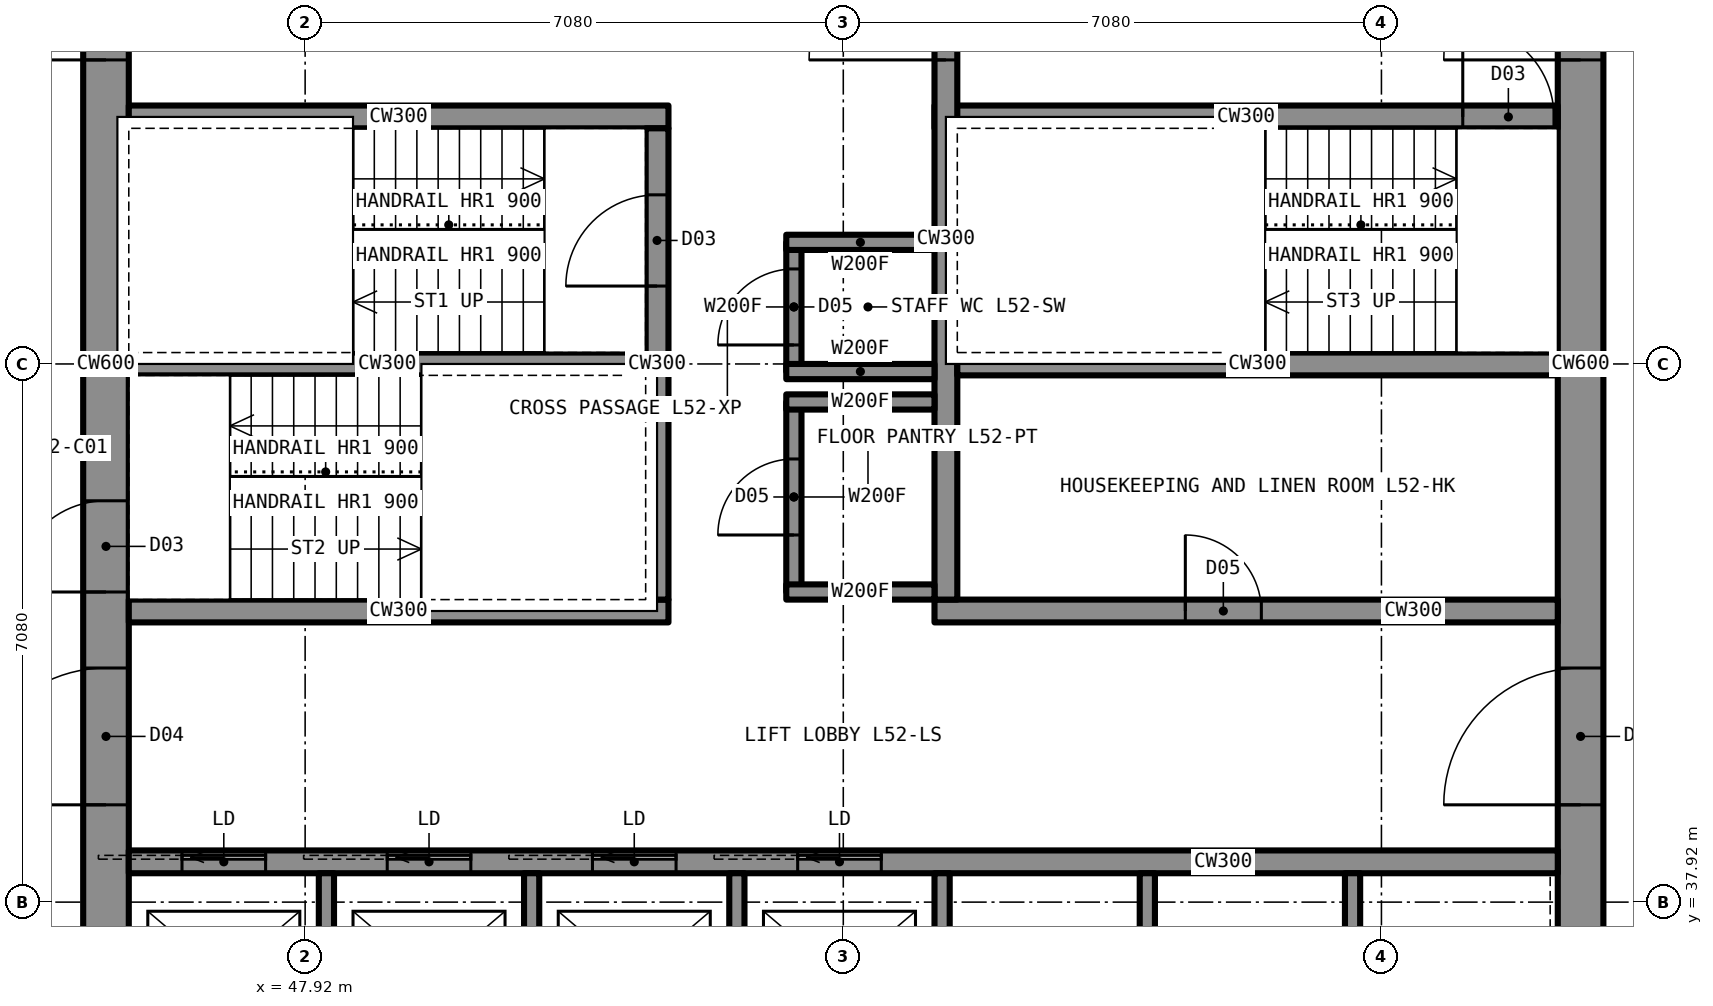
"""IFC4 building model, lengths in metres.
Left out: names, types, materials, properties, quantities, classifications, styles, units other than length and angle.
Written with IfcOpenShell. Run it as: python <this file> out.ifc"""

import sys

from ifc_helpers import new_model, si_unit, direction, frame, frame_2d, origin, place, context, subcontext, project, spatial, rectangle, extrude, element, fill, save


model = new_model("IFC4")
c1 = context("Model", 3, precision=1e-05, world=origin(), true_north=direction((0.0, 1.0)))
c2 = subcontext(c1, "Body", "Model", "MODEL_VIEW")
j1 = project(units=[si_unit("LENGTHUNIT", "METRE"), si_unit("PLANEANGLEUNIT", "RADIAN")], contexts=[c1])
p1 = place(None, origin())
s1 = spatial("IfcSite", under=j1, at=p1, CompositionType="ELEMENT")
p2 = place(p1, origin())
s2 = spatial("IfcBuilding", under=s1, at=p2, CompositionType="ELEMENT")
p3 = place(p2, frame((0.0, 0.0, 193.3)))
s3 = spatial("IfcBuildingStorey", under=s2, at=p3, CompositionType="ELEMENT", Elevation=193.3)
p4 = place(p3, frame((64.7, 35.6, 0.0), z_axis=(0.0, 0.0, 1.0), x_axis=(0.0, 1.0, 0.0)))
e1 = element("IfcWall", 1, at=p4, inside=s3, PredefinedType="SHEAR", context=c2, shape_type="SweptSolid", body=[
    extrude(rectangle(XDim=18.8, YDim=0.6, at=frame_2d((9.4, 0.0))), origin(), (0.0, 0.0, 1.0), 3.5),
])
p5 = place(p4, frame((13.4, 0.0, 0.0)))
e2 = element("IfcOpeningElement", 2, at=p5, cuts=e1, PredefinedType="OPENING", context=c2, shape_type="SweptSolid", body=[
    extrude(rectangle(XDim=1.8, YDim=2.2, at=frame_2d((0.9, 1.1))), frame((0.0, 0.31, 0.0), z_axis=(0.0, -1.0, 0.0), x_axis=(1.0, 0.0, 0.0)), (0.0, 0.0, 1.0), 0.62),
])
p6 = place(p4, frame((3.6, 0.0, 0.0)))
e3 = element("IfcOpeningElement", 3, at=p6, cuts=e1, PredefinedType="OPENING", context=c2, shape_type="SweptSolid", body=[
    extrude(rectangle(XDim=1.8, YDim=2.2, at=frame_2d((0.9, 1.1))), frame((0.0, 0.31, 0.0), z_axis=(0.0, -1.0, 0.0), x_axis=(1.0, 0.0, 0.0)), (0.0, 0.0, 1.0), 0.62),
])
p7 = place(p3, frame((45.3, 35.6, 0.0), z_axis=(0.0, 0.0, 1.0), x_axis=(0.0, 1.0, 0.0)))
e4 = element("IfcWall", 4, at=p7, inside=s3, PredefinedType="SHEAR", context=c2, shape_type="SweptSolid", body=[
    extrude(rectangle(XDim=18.8, YDim=0.6, at=frame_2d((9.4, 0.0))), origin(), (0.0, 0.0, 1.0), 3.5),
])
p8 = place(p7, frame((13.4, 0.0, 0.0)))
e5 = element("IfcOpeningElement", 5, at=p8, cuts=e4, PredefinedType="OPENING", context=c2, shape_type="SweptSolid", body=[
    extrude(rectangle(XDim=1.8, YDim=2.2, at=frame_2d((0.9, 1.1))), frame((0.0, 0.31, 0.0), z_axis=(0.0, -1.0, 0.0), x_axis=(1.0, 0.0, 0.0)), (0.0, 0.0, 1.0), 0.62),
])
p9 = place(p7, frame((3.6, 0.0, 0.0)))
e6 = element("IfcOpeningElement", 6, at=p9, cuts=e4, PredefinedType="OPENING", context=c2, shape_type="SweptSolid", body=[
    extrude(rectangle(XDim=1.8, YDim=2.2, at=frame_2d((0.9, 1.1))), frame((0.0, 0.31, 0.0), z_axis=(0.0, -1.0, 0.0), x_axis=(1.0, 0.0, 0.0)), (0.0, 0.0, 1.0), 0.62),
])
p10 = place(p7, frame((6.4, 0.0, 0.0)))
e7 = element("IfcOpeningElement", 7, at=p10, cuts=e4, PredefinedType="OPENING", context=c2, shape_type="SweptSolid", body=[
    extrude(rectangle(XDim=1.2, YDim=2.2, at=frame_2d((0.6, 1.1))), frame((0.0, 0.31, 0.0), z_axis=(0.0, -1.0, 0.0), x_axis=(1.0, 0.0, 0.0)), (0.0, 0.0, 1.0), 0.62),
])
p11 = place(p3, frame((45.6, 38.45, 0.0), z_axis=(0.0, 0.0, 1.0), x_axis=(1.0, 0.0, 0.0)))
e8 = element("IfcWall", 8, at=p11, inside=s3, PredefinedType="SHEAR", context=c2, shape_type="SweptSolid", body=[
    extrude(rectangle(XDim=18.8, YDim=0.3, at=frame_2d((9.4, 0.0))), origin(), (0.0, 0.0, 1.0), 3.5),
])
p12 = place(p11, frame((0.7, 0.0, 0.0)))
e9 = element("IfcOpeningElement", 9, at=p12, cuts=e8, PredefinedType="OPENING", context=c2, shape_type="SweptSolid", body=[
    extrude(rectangle(XDim=1.1, YDim=2.2, at=frame_2d((0.55, 1.1))), frame((0.0, 0.16, 0.0), z_axis=(0.0, -1.0, 0.0), x_axis=(1.0, 0.0, 0.0)), (0.0, 0.0, 1.0), 0.32),
])
p13 = place(p11, frame((3.4, 0.0, 0.0)))
e10 = element("IfcOpeningElement", 10, at=p13, cuts=e8, PredefinedType="OPENING", context=c2, shape_type="SweptSolid", body=[
    extrude(rectangle(XDim=1.1, YDim=2.2, at=frame_2d((0.55, 1.1))), frame((0.0, 0.16, 0.0), z_axis=(0.0, -1.0, 0.0), x_axis=(1.0, 0.0, 0.0)), (0.0, 0.0, 1.0), 0.32),
])
p14 = place(p11, frame((6.1, 0.0, 0.0)))
e11 = element("IfcOpeningElement", 11, at=p14, cuts=e8, PredefinedType="OPENING", context=c2, shape_type="SweptSolid", body=[
    extrude(rectangle(XDim=1.1, YDim=2.2, at=frame_2d((0.55, 1.1))), frame((0.0, 0.16, 0.0), z_axis=(0.0, -1.0, 0.0), x_axis=(1.0, 0.0, 0.0)), (0.0, 0.0, 1.0), 0.32),
])
p15 = place(p11, frame((8.8, 0.0, 0.0)))
e12 = element("IfcOpeningElement", 12, at=p15, cuts=e8, PredefinedType="OPENING", context=c2, shape_type="SweptSolid", body=[
    extrude(rectangle(XDim=1.1, YDim=2.2, at=frame_2d((0.55, 1.1))), frame((0.0, 0.16, 0.0), z_axis=(0.0, -1.0, 0.0), x_axis=(1.0, 0.0, 0.0)), (0.0, 0.0, 1.0), 0.32),
])
p16 = place(p3, frame((45.6, 48.25, 0.0), z_axis=(0.0, 0.0, 1.0), x_axis=(1.0, 0.0, 0.0)))
e13 = element("IfcWall", 13, at=p16, inside=s3, PredefinedType="SHEAR", context=c2, shape_type="SweptSolid", body=[
    extrude(rectangle(XDim=7.1, YDim=0.3, at=frame_2d((3.55, 0.0))), origin(), (0.0, 0.0, 1.0), 3.5),
])
p17 = place(p3, frame((56.2, 48.25, 0.0), z_axis=(0.0, 0.0, 1.0), x_axis=(1.0, 0.0, 0.0)))
e14 = element("IfcWall", 14, at=p17, inside=s3, PredefinedType="SHEAR", context=c2, shape_type="SweptSolid", body=[
    extrude(rectangle(XDim=8.2, YDim=0.3, at=frame_2d((4.1, 0.0))), origin(), (0.0, 0.0, 1.0), 3.5),
])
p18 = place(p17, frame((6.95, 0.0, 0.0)))
e15 = element("IfcOpeningElement", 15, at=p18, cuts=e14, PredefinedType="OPENING", context=c2, shape_type="SweptSolid", body=[
    extrude(rectangle(XDim=1.2, YDim=2.2, at=frame_2d((0.6, 1.1))), frame((0.0, 0.16, 0.0), z_axis=(0.0, -1.0, 0.0), x_axis=(1.0, 0.0, 0.0)), (0.0, 0.0, 1.0), 0.32),
])
p19 = place(p3, frame((45.6, 41.75, 0.0), z_axis=(0.0, 0.0, 1.0), x_axis=(1.0, 0.0, 0.0)))
e16 = element("IfcWall", 16, at=p19, inside=s3, PredefinedType="SHEAR", context=c2, shape_type="SweptSolid", body=[
    extrude(rectangle(XDim=7.1, YDim=0.3, at=frame_2d((3.55, 0.0))), origin(), (0.0, 0.0, 1.0), 3.5),
])
p20 = place(p3, frame((56.2, 41.75, 0.0), z_axis=(0.0, 0.0, 1.0), x_axis=(1.0, 0.0, 0.0)))
e17 = element("IfcWall", 17, at=p20, inside=s3, PredefinedType="SHEAR", context=c2, shape_type="SweptSolid", body=[
    extrude(rectangle(XDim=8.2, YDim=0.3, at=frame_2d((4.1, 0.0))), origin(), (0.0, 0.0, 1.0), 3.5),
])
p21 = place(p20, frame((3.3, 0.0, 0.0)))
e18 = element("IfcOpeningElement", 18, at=p21, cuts=e17, PredefinedType="OPENING", context=c2, shape_type="SweptSolid", body=[
    extrude(rectangle(XDim=1.0, YDim=2.1, at=frame_2d((0.5, 1.05))), frame((0.0, 0.16, 0.0), z_axis=(0.0, -1.0, 0.0), x_axis=(1.0, 0.0, 0.0)), (0.0, 0.0, 1.0), 0.32),
])
p22 = place(p3, frame((52.55, 41.9, 0.0), z_axis=(0.0, 0.0, 1.0), x_axis=(0.0, 1.0, 0.0)))
e19 = element("IfcWall", 19, at=p22, inside=s3, PredefinedType="SHEAR", context=c2, shape_type="SweptSolid", body=[
    extrude(rectangle(XDim=6.2, YDim=0.3, at=frame_2d((3.1, 0.0))), origin(), (0.0, 0.0, 1.0), 3.5),
])
p23 = place(p22, frame((4.125, 0.0, 0.0)))
e20 = element("IfcOpeningElement", 20, at=p23, cuts=e19, PredefinedType="OPENING", context=c2, shape_type="SweptSolid", body=[
    extrude(rectangle(XDim=1.2, YDim=2.2, at=frame_2d((0.6, 1.1))), frame((0.0, 0.16, 0.0), z_axis=(0.0, -1.0, 0.0), x_axis=(1.0, 0.0, 0.0)), (0.0, 0.0, 1.0), 0.32),
])
p24 = place(p3, frame((56.35, 41.9, 0.0), z_axis=(0.0, 0.0, 1.0), x_axis=(0.0, 1.0, 0.0)))
e21 = element("IfcWall", 21, at=p24, inside=s3, PredefinedType="SHEAR", context=c2, shape_type="SweptSolid", body=[
    extrude(rectangle(XDim=9.5, YDim=0.3, at=frame_2d((4.75, 0.0))), origin(), (0.0, 0.0, 1.0), 3.5),
])
p25 = place(p24, frame((7.1, 0.0, 0.0)))
e22 = element("IfcOpeningElement", 22, at=p25, cuts=e21, PredefinedType="OPENING", context=c2, shape_type="SweptSolid", body=[
    extrude(rectangle(XDim=1.8, YDim=2.2, at=frame_2d((0.9, 1.1))), frame((0.0, 0.16, 0.0), z_axis=(0.0, -1.0, 0.0), x_axis=(1.0, 0.0, 0.0)), (0.0, 0.0, 1.0), 0.32),
])
p26 = place(p3, frame((45.6, 45.0, 0.0), z_axis=(0.0, 0.0, 1.0), x_axis=(1.0, 0.0, 0.0)))
e23 = element("IfcWall", 23, at=p26, inside=s3, PredefinedType="SHEAR", context=c2, shape_type="SweptSolid", body=[
    extrude(rectangle(XDim=6.8, YDim=0.3, at=frame_2d((3.4, 0.0))), origin(), (0.0, 0.0, 1.0), 3.5),
])
p27 = place(p3, frame((56.5, 45.0, 0.0), z_axis=(0.0, 0.0, 1.0), x_axis=(1.0, 0.0, 0.0)))
e24 = element("IfcWall", 24, at=p27, inside=s3, PredefinedType="SHEAR", context=c2, shape_type="SweptSolid", body=[
    extrude(rectangle(XDim=7.9, YDim=0.3, at=frame_2d((3.95, 0.0))), origin(), (0.0, 0.0, 1.0), 3.5),
])
p28 = place(p3, frame((54.35, 42.0, 0.0), z_axis=(0.0, 0.0, 1.0), x_axis=(0.0, 1.0, 0.0)))
e25 = element("IfcWall", 25, at=p28, inside=s3, PredefinedType="PARTITIONING", context=c2, shape_type="SweptSolid", body=[
    extrude(rectangle(XDim=2.5, YDim=0.2, at=frame_2d((1.25, 0.0))), origin(), (0.0, 0.0, 1.0), 3.33),
])
p29 = place(p28, frame((0.75, 0.0, 0.0)))
e26 = element("IfcOpeningElement", 26, at=p29, cuts=e25, PredefinedType="OPENING", context=c2, shape_type="SweptSolid", body=[
    extrude(rectangle(XDim=1.0, YDim=2.1, at=frame_2d((0.5, 1.05))), frame((0.0, 0.11, 0.0), z_axis=(0.0, -1.0, 0.0), x_axis=(1.0, 0.0, 0.0)), (0.0, 0.0, 1.0), 0.22),
])
for number, where, z_axis, x_axis in (
    (27, (54.25, 42.0, 0.0), (0.0, 0.0, 1.0), (1.0, 0.0, 0.0)),
    (28, (54.25, 44.5, 0.0), (0.0, 0.0, 1.0), (1.0, 0.0, 0.0)),
):
    element("IfcWall", number, at=place(p3, frame(where, z_axis=z_axis, x_axis=x_axis)), inside=s3, PredefinedType="PARTITIONING", context=c2, shape_type="SweptSolid", body=[
        extrude(rectangle(XDim=1.95, YDim=0.2, at=frame_2d((0.975, 0.0))), origin(), (0.0, 0.0, 1.0), 3.33),
    ])
p30 = place(p3, frame((54.35, 44.9, 0.0), z_axis=(0.0, 0.0, 1.0), x_axis=(0.0, 1.0, 0.0)))
e29 = element("IfcWall", 29, at=p30, inside=s3, PredefinedType="PARTITIONING", context=c2, shape_type="SweptSolid", body=[
    extrude(rectangle(XDim=1.7, YDim=0.2, at=frame_2d((0.85, 0.0))), origin(), (0.0, 0.0, 1.0), 3.33),
])
p31 = place(p30, frame((0.35, 0.0, 0.0)))
e30 = element("IfcOpeningElement", 30, at=p31, cuts=e29, PredefinedType="OPENING", context=c2, shape_type="SweptSolid", body=[
    extrude(rectangle(XDim=1.0, YDim=2.1, at=frame_2d((0.5, 1.05))), frame((0.0, 0.11, 0.0), z_axis=(0.0, -1.0, 0.0), x_axis=(1.0, 0.0, 0.0)), (0.0, 0.0, 1.0), 0.22),
])
for number, where, z_axis, x_axis in (
    (31, (54.25, 44.9, 0.0), (0.0, 0.0, 1.0), (1.0, 0.0, 0.0)),
    (32, (54.25, 46.6, 0.0), (0.0, 0.0, 1.0), (1.0, 0.0, 0.0)),
):
    element("IfcWall", number, at=place(p3, frame(where, z_axis=z_axis, x_axis=x_axis)), inside=s3, PredefinedType="PARTITIONING", context=c2, shape_type="SweptSolid", body=[
        extrude(rectangle(XDim=1.95, YDim=0.2, at=frame_2d((0.975, 0.0))), origin(), (0.0, 0.0, 1.0), 3.33),
    ])
for number, where, z_axis, x_axis in (
    (33, (48.2, 35.6, 0.0), (0.0, 0.0, 1.0), (0.0, 1.0, 0.0)),
    (34, (50.9, 35.6, 0.0), (0.0, 0.0, 1.0), (0.0, 1.0, 0.0)),
    (35, (53.6, 35.6, 0.0), (0.0, 0.0, 1.0), (0.0, 1.0, 0.0)),
    (36, (56.3, 35.6, 0.0), (0.0, 0.0, 1.0), (0.0, 1.0, 0.0)),
    (37, (59.0, 35.6, 0.0), (0.0, 0.0, 1.0), (0.0, 1.0, 0.0)),
    (38, (61.7, 35.6, 0.0), (0.0, 0.0, 1.0), (0.0, 1.0, 0.0)),
):
    element("IfcWall", number, at=place(p3, frame(where, z_axis=z_axis, x_axis=x_axis)), inside=s3, PredefinedType="PARTITIONING", context=c2, shape_type="SweptSolid", body=[
        extrude(rectangle(XDim=2.7, YDim=0.2, at=frame_2d((1.35, 0.0))), origin(), (0.0, 0.0, 1.0), 3.33),
    ])
p32 = place(p29, origin())
e39 = element("IfcDoor", 39, at=p32, inside=s3, OperationType="SINGLE_SWING_LEFT", PredefinedType="DOOR", context=c2, shape_type="SweptSolid", body=[
    extrude(rectangle(XDim=1.0, YDim=2.1, at=frame_2d((0.5, 1.05))), frame((0.0, 0.025, 0.0), z_axis=(0.0, -1.0, 0.0), x_axis=(1.0, 0.0, 0.0)), (0.0, 0.0, 1.0), 0.05),
])
fill(e26, e39)
p33 = place(p31, origin())
e40 = element("IfcDoor", 40, at=p33, inside=s3, OperationType="SINGLE_SWING_LEFT", PredefinedType="DOOR", context=c2, shape_type="SweptSolid", body=[
    extrude(rectangle(XDim=1.0, YDim=2.1, at=frame_2d((0.5, 1.05))), frame((0.0, 0.025, 0.0), z_axis=(0.0, -1.0, 0.0), x_axis=(1.0, 0.0, 0.0)), (0.0, 0.0, 1.0), 0.05),
])
fill(e30, e40)
p34 = place(p8, origin())
e41 = element("IfcDoor", 41, at=p34, inside=s3, OperationType="DOUBLE_DOOR_SINGLE_SWING", PredefinedType="DOOR", context=c2, shape_type="SweptSolid", body=[
    extrude(rectangle(XDim=1.8, YDim=2.2, at=frame_2d((0.9, 1.1))), frame((0.0, 0.025, 0.0), z_axis=(0.0, -1.0, 0.0), x_axis=(1.0, 0.0, 0.0)), (0.0, 0.0, 1.0), 0.05),
])
fill(e5, e41)
p35 = place(p9, origin())
e42 = element("IfcDoor", 42, at=p35, inside=s3, OperationType="DOUBLE_DOOR_SINGLE_SWING", PredefinedType="DOOR", context=c2, shape_type="SweptSolid", body=[
    extrude(rectangle(XDim=1.8, YDim=2.2, at=frame_2d((0.9, 1.1))), frame((0.0, 0.025, 0.0), z_axis=(0.0, -1.0, 0.0), x_axis=(1.0, 0.0, 0.0)), (0.0, 0.0, 1.0), 0.05),
])
fill(e6, e42)
p36 = place(p5, origin())
e43 = element("IfcDoor", 43, at=p36, inside=s3, OperationType="DOUBLE_DOOR_SINGLE_SWING", PredefinedType="DOOR", context=c2, shape_type="SweptSolid", body=[
    extrude(rectangle(XDim=1.8, YDim=2.2, at=frame_2d((0.9, 1.1))), frame((0.0, 0.025, 0.0), z_axis=(0.0, -1.0, 0.0), x_axis=(1.0, 0.0, 0.0)), (0.0, 0.0, 1.0), 0.05),
])
fill(e2, e43)
p37 = place(p6, origin())
e44 = element("IfcDoor", 44, at=p37, inside=s3, OperationType="DOUBLE_DOOR_SINGLE_SWING", PredefinedType="DOOR", context=c2, shape_type="SweptSolid", body=[
    extrude(rectangle(XDim=1.8, YDim=2.2, at=frame_2d((0.9, 1.1))), frame((0.0, 0.025, 0.0), z_axis=(0.0, -1.0, 0.0), x_axis=(1.0, 0.0, 0.0)), (0.0, 0.0, 1.0), 0.05),
])
fill(e3, e44)
p38 = place(p25, origin())
e45 = element("IfcDoor", 45, at=p38, inside=s3, OperationType="DOUBLE_DOOR_SINGLE_SWING", PredefinedType="DOOR", context=c2, shape_type="SweptSolid", body=[
    extrude(rectangle(XDim=1.8, YDim=2.2, at=frame_2d((0.9, 1.1))), frame((0.0, 0.025, 0.0), z_axis=(0.0, -1.0, 0.0), x_axis=(1.0, 0.0, 0.0)), (0.0, 0.0, 1.0), 0.05),
])
fill(e22, e45)
p39 = place(p23, origin())
e46 = element("IfcDoor", 46, at=p39, inside=s3, OperationType="SINGLE_SWING_LEFT", PredefinedType="DOOR", context=c2, shape_type="SweptSolid", body=[
    extrude(rectangle(XDim=1.2, YDim=2.2, at=frame_2d((0.6, 1.1))), frame((0.0, 0.025, 0.0), z_axis=(0.0, -1.0, 0.0), x_axis=(1.0, 0.0, 0.0)), (0.0, 0.0, 1.0), 0.05),
])
fill(e20, e46)
p40 = place(p10, origin())
e47 = element("IfcDoor", 47, at=p40, inside=s3, OperationType="SINGLE_SWING_LEFT", PredefinedType="DOOR", context=c2, shape_type="SweptSolid", body=[
    extrude(rectangle(XDim=1.2, YDim=2.2, at=frame_2d((0.6, 1.1))), frame((0.0, 0.025, 0.0), z_axis=(0.0, -1.0, 0.0), x_axis=(1.0, 0.0, 0.0)), (0.0, 0.0, 1.0), 0.05),
])
fill(e7, e47)
p41 = place(p18, origin())
e48 = element("IfcDoor", 48, at=p41, inside=s3, OperationType="SINGLE_SWING_LEFT", PredefinedType="DOOR", context=c2, shape_type="SweptSolid", body=[
    extrude(rectangle(XDim=1.2, YDim=2.2, at=frame_2d((0.6, 1.1))), frame((0.0, 0.025, 0.0), z_axis=(0.0, -1.0, 0.0), x_axis=(1.0, 0.0, 0.0)), (0.0, 0.0, 1.0), 0.05),
])
fill(e15, e48)
p42 = place(p21, origin())
e49 = element("IfcDoor", 49, at=p42, inside=s3, OperationType="SINGLE_SWING_LEFT", PredefinedType="DOOR", context=c2, shape_type="SweptSolid", body=[
    extrude(rectangle(XDim=1.0, YDim=2.1, at=frame_2d((0.5, 1.05))), frame((0.0, 0.025, 0.0), z_axis=(0.0, -1.0, 0.0), x_axis=(1.0, 0.0, 0.0)), (0.0, 0.0, 1.0), 0.05),
])
fill(e18, e49)
p43 = place(p12, origin())
e50 = element("IfcDoor", 50, at=p43, inside=s3, OperationType="SLIDING_TO_LEFT", PredefinedType="DOOR", context=c2, shape_type="SweptSolid", body=[
    extrude(rectangle(XDim=1.1, YDim=2.2, at=frame_2d((0.55, 1.1))), frame((0.0, 0.025, 0.0), z_axis=(0.0, -1.0, 0.0), x_axis=(1.0, 0.0, 0.0)), (0.0, 0.0, 1.0), 0.05),
])
fill(e9, e50)
p44 = place(p13, origin())
e51 = element("IfcDoor", 51, at=p44, inside=s3, OperationType="SLIDING_TO_LEFT", PredefinedType="DOOR", context=c2, shape_type="SweptSolid", body=[
    extrude(rectangle(XDim=1.1, YDim=2.2, at=frame_2d((0.55, 1.1))), frame((0.0, 0.025, 0.0), z_axis=(0.0, -1.0, 0.0), x_axis=(1.0, 0.0, 0.0)), (0.0, 0.0, 1.0), 0.05),
])
fill(e10, e51)
p45 = place(p14, origin())
e52 = element("IfcDoor", 52, at=p45, inside=s3, OperationType="SLIDING_TO_LEFT", PredefinedType="DOOR", context=c2, shape_type="SweptSolid", body=[
    extrude(rectangle(XDim=1.1, YDim=2.2, at=frame_2d((0.55, 1.1))), frame((0.0, 0.025, 0.0), z_axis=(0.0, -1.0, 0.0), x_axis=(1.0, 0.0, 0.0)), (0.0, 0.0, 1.0), 0.05),
])
fill(e11, e52)
p46 = place(p15, origin())
e53 = element("IfcDoor", 53, at=p46, inside=s3, OperationType="SLIDING_TO_LEFT", PredefinedType="DOOR", context=c2, shape_type="SweptSolid", body=[
    extrude(rectangle(XDim=1.1, YDim=2.2, at=frame_2d((0.55, 1.1))), frame((0.0, 0.025, 0.0), z_axis=(0.0, -1.0, 0.0), x_axis=(1.0, 0.0, 0.0)), (0.0, 0.0, 1.0), 0.05),
])
fill(e12, e53)
save(model, sys.argv[1])
